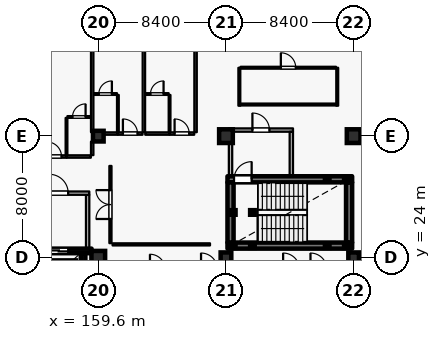
"""IFC4 building model, lengths in metres.
Left out: names, types, materials, properties, quantities, classifications, styles, units other than length and angle.
Written with IfcOpenShell. Run it as: python <this file> out.ifc"""

import sys

from ifc_helpers import new_model, si_unit, direction, frame, frame_2d, origin, origin_2d, place, context, subcontext, project, spatial, rectangle, hollow_rectangle, extrude, element, fill, save


model = new_model("IFC4")
c1 = context("Model", 3, precision=1e-05, world=origin(), true_north=direction((0.0, 1.0)))
c2 = subcontext(c1, "Body", "Model", "MODEL_VIEW")
j1 = project(units=[si_unit("LENGTHUNIT", "METRE"), si_unit("PLANEANGLEUNIT", "RADIAN")], contexts=[c1])
p1 = place(None, origin())
s1 = spatial("IfcSite", under=j1, at=p1, CompositionType="ELEMENT")
p2 = place(p1, origin())
s2 = spatial("IfcBuilding", under=s1, at=p2, CompositionType="ELEMENT")
p3 = place(p2, frame((0.0, 0.0, 21.0)))
s3 = spatial("IfcBuildingStorey", under=s2, at=p3, CompositionType="ELEMENT", Elevation=21.0)
for number, where, z_axis, x_axis in (
    (1, (159.6, 24.0, 0.0), (0.0, 0.0, 1.0), (1.0, 0.0, 0.0)),
    (2, (168.0, 32.0, 0.0), (0.0, 0.0, 1.0), (1.0, 0.0, 0.0)),
    (3, (176.4, 32.0, 0.0), (0.0, 0.0, 1.0), (1.0, 0.0, 0.0)),
):
    element("IfcColumn", number, at=place(p3, frame(where, z_axis=z_axis, x_axis=x_axis)), inside=s3, PredefinedType="COLUMN", context=c2, shape_type="SweptSolid", body=[
        extrude(rectangle(XDim=0.9, YDim=0.9, at=origin_2d()), origin(), (0.0, 0.0, 1.0), 4.2),
    ])
for number, where, z_axis, x_axis in (
    (4, (159.6, 32.0, 0.0), (0.0, 0.0, 1.0), (1.0, 0.0, 0.0)),
    (5, (168.0, 24.0, 0.0), (0.0, 0.0, 1.0), (1.0, 0.0, 0.0)),
    (6, (176.4, 24.0, 0.0), (0.0, 0.0, 1.0), (1.0, 0.0, 0.0)),
):
    element("IfcColumn", number, at=place(p3, frame(where, z_axis=z_axis, x_axis=x_axis)), inside=s3, PredefinedType="COLUMN", context=c2, shape_type="SweptSolid", body=[
        extrude(rectangle(XDim=0.7, YDim=0.7, at=origin_2d()), origin(), (0.0, 0.0, 1.0), 4.2),
    ])
p4 = place(p3, frame((158.6, 21.705, 0.0), z_axis=(0.0, 0.0, 1.0), x_axis=(0.0, 1.0, 0.0)))
e7 = element("IfcWall", 7, at=p4, inside=s3, PredefinedType="SHEAR", context=c2, shape_type="SweptSolid", body=[
    extrude(rectangle(XDim=2.59, YDim=0.3, at=frame_2d((1.295, 0.0))), origin(), (0.0, 0.0, 1.0), 3.965),
])
p5 = place(p3, frame((159.16, 24.45, 0.0), z_axis=(0.0, 0.0, 1.0), x_axis=(-1.0, 0.0, 0.0)))
e8 = element("IfcWall", 8, at=p5, inside=s3, PredefinedType="SHEAR", context=c2, shape_type="SweptSolid", body=[
    extrude(rectangle(XDim=3.91, YDim=0.3, at=frame_2d((1.955, 0.0))), origin(), (0.0, 0.0, 1.0), 3.965),
])
p6 = place(p5, frame((1.535, 0.0, 0.0)))
e9 = element("IfcOpeningElement", 9, at=p6, cuts=e8, PredefinedType="OPENING", context=c2, shape_type="SweptSolid", body=[
    extrude(rectangle(XDim=1.25, YDim=2.25, at=frame_2d((0.625, 1.125))), frame((0.0, 0.16, 0.0), z_axis=(0.0, -1.0, 0.0), x_axis=(1.0, 0.0, 0.0)), (0.0, 0.0, 1.0), 0.32),
])
p7 = place(p3, frame((158.9, 24.605, 0.0), z_axis=(0.0, 0.0, 1.0), x_axis=(0.0, 1.0, 0.0)))
e10 = element("IfcWall", 10, at=p7, inside=s3, PredefinedType="PARTITIONING", context=c2, shape_type="SweptSolid", body=[
    extrude(rectangle(XDim=3.53, YDim=0.22, at=frame_2d((1.765, 0.0))), origin(), (0.0, 0.0, 1.0), 3.965),
])
p8 = place(p3, frame((154.99, 28.25, 0.0), z_axis=(0.0, 0.0, 1.0), x_axis=(1.0, 0.0, 0.0)))
e11 = element("IfcWall", 11, at=p8, inside=s3, PredefinedType="PARTITIONING", context=c2, shape_type="SweptSolid", body=[
    extrude(rectangle(XDim=4.02, YDim=0.22, at=frame_2d((2.01, 0.0))), origin(), (0.0, 0.0, 1.0), 3.965),
])
p9 = place(p8, frame((1.39, 0.0, 0.0)))
e12 = element("IfcOpeningElement", 12, at=p9, cuts=e11, PredefinedType="OPENING", context=c2, shape_type="SweptSolid", body=[
    extrude(rectangle(XDim=1.24, YDim=2.2, at=frame_2d((0.62, 1.1))), frame((0.0, 0.12, 0.0), z_axis=(0.0, -1.0, 0.0), x_axis=(1.0, 0.0, 0.0)), (0.0, 0.0, 1.0), 0.24),
])
p10 = place(p3, frame((168.1, 24.8, 0.0), z_axis=(0.0, 0.0, 1.0), x_axis=(1.0, 0.0, 0.0)))
e13 = element("IfcWall", 13, at=p10, inside=s3, PredefinedType="SHEAR", context=c2, shape_type="SweptSolid", body=[
    extrude(rectangle(XDim=8.2, YDim=0.4, at=frame_2d((4.1, 0.0))), origin(), (0.0, 0.0, 1.0), 3.965),
])
p11 = place(p3, frame((176.1, 25.005, 0.0), z_axis=(0.0, 0.0, 1.0), x_axis=(0.0, 1.0, 0.0)))
e14 = element("IfcWall", 14, at=p11, inside=s3, PredefinedType="SHEAR", context=c2, shape_type="SweptSolid", body=[
    extrude(rectangle(XDim=3.95, YDim=0.4, at=frame_2d((1.975, 0.0))), origin(), (0.0, 0.0, 1.0), 3.965),
])
p12 = place(p3, frame((168.1, 29.16, 0.0), z_axis=(0.0, 0.0, 1.0), x_axis=(1.0, 0.0, 0.0)))
e15 = element("IfcWall", 15, at=p12, inside=s3, PredefinedType="SHEAR", context=c2, shape_type="SweptSolid", body=[
    extrude(rectangle(XDim=8.2, YDim=0.4, at=frame_2d((4.1, 0.0))), origin(), (0.0, 0.0, 1.0), 3.965),
])
p13 = place(p12, frame((0.43, 0.0, 0.0)))
e16 = element("IfcOpeningElement", 16, at=p13, cuts=e15, PredefinedType="OPENING", context=c2, shape_type="SweptSolid", body=[
    extrude(rectangle(XDim=1.16, YDim=2.2, at=frame_2d((0.58, 1.1))), frame((0.0, 0.21, 0.0), z_axis=(0.0, -1.0, 0.0), x_axis=(1.0, 0.0, 0.0)), (0.0, 0.0, 1.0), 0.42),
])
p14 = place(p3, frame((168.3, 25.005, 0.0), z_axis=(0.0, 0.0, 1.0), x_axis=(0.0, 1.0, 0.0)))
e17 = element("IfcWall", 17, at=p14, inside=s3, PredefinedType="SHEAR", context=c2, shape_type="SweptSolid", body=[
    extrude(rectangle(XDim=3.95, YDim=0.4, at=frame_2d((1.975, 0.0))), origin(), (0.0, 0.0, 1.0), 3.965),
])
p15 = place(p3, frame((168.3, 29.365, 0.0), z_axis=(0.0, 0.0, 1.0), x_axis=(0.0, 1.0, 0.0)))
e18 = element("IfcWall", 18, at=p15, inside=s3, PredefinedType="PARTITIONING", context=c2, shape_type="SweptSolid", body=[
    extrude(rectangle(XDim=2.92, YDim=0.22, at=frame_2d((1.46, 0.0))), origin(), (0.0, 0.0, 1.0), 3.965),
])
p16 = place(p3, frame((168.19, 32.4, 0.0), z_axis=(0.0, 0.0, 1.0), x_axis=(1.0, 0.0, 0.0)))
e19 = element("IfcWall", 19, at=p16, inside=s3, PredefinedType="PARTITIONING", context=c2, shape_type="SweptSolid", body=[
    extrude(rectangle(XDim=4.22, YDim=0.22, at=frame_2d((2.11, 0.0))), origin(), (0.0, 0.0, 1.0), 3.965),
])
p17 = place(p16, frame((1.55, 0.0, 0.0)))
e20 = element("IfcOpeningElement", 20, at=p17, cuts=e19, PredefinedType="OPENING", context=c2, shape_type="SweptSolid", body=[
    extrude(rectangle(XDim=1.12, YDim=2.2, at=frame_2d((0.56, 1.1))), frame((0.0, 0.12, 0.0), z_axis=(0.0, -1.0, 0.0), x_axis=(1.0, 0.0, 0.0)), (0.0, 0.0, 1.0), 0.24),
])
p18 = place(p3, frame((172.3, 29.365, 0.0), z_axis=(0.0, 0.0, 1.0), x_axis=(0.0, 1.0, 0.0)))
e21 = element("IfcWall", 21, at=p18, inside=s3, PredefinedType="PARTITIONING", context=c2, shape_type="SweptSolid", body=[
    extrude(rectangle(XDim=2.92, YDim=0.22, at=frame_2d((1.46, 0.0))), origin(), (0.0, 0.0, 1.0), 3.965),
])
for number, where, z_axis, x_axis in (
    (22, (168.48, 24.8, 0.0), (0.0, 0.0, 1.0), (1.0, 0.0, 0.0)),
    (23, (168.48, 26.98, 0.0), (0.0, 0.0, 1.0), (1.0, 0.0, 0.0)),
    (24, (169.74, 24.8, 0.0), (0.0, 0.0, 1.0), (1.0, 0.0, 0.0)),
    (25, (169.74, 26.98, 0.0), (0.0, 0.0, 1.0), (1.0, 0.0, 0.0)),
):
    element("IfcColumn", number, at=place(p3, frame(where, z_axis=z_axis, x_axis=x_axis)), inside=s3, PredefinedType="COLUMN", context=c2, shape_type="SweptSolid", body=[
        extrude(hollow_rectangle(XDim=0.3, YDim=0.3, WallThickness=0.012, at=origin_2d()), origin(), (0.0, 0.0, 1.0), 4.02),
    ])
for number, where, z_axis, x_axis in (
    (26, (174.66, 24.8, -2.4), (0.0, 0.0, 1.0), (1.0, 0.0, 0.0)),
    (27, (174.66, 29.16, -2.4), (0.0, 0.0, 1.0), (1.0, 0.0, 0.0)),
    (28, (175.92, 24.8, -2.4), (0.0, 0.0, 1.0), (1.0, 0.0, 0.0)),
    (29, (175.92, 29.16, -2.4), (0.0, 0.0, 1.0), (1.0, 0.0, 0.0)),
):
    element("IfcColumn", number, at=place(p3, frame(where, z_axis=z_axis, x_axis=x_axis)), inside=s3, PredefinedType="COLUMN", context=c2, shape_type="SweptSolid", body=[
        extrude(hollow_rectangle(XDim=0.3, YDim=0.3, WallThickness=0.012, at=origin_2d()), origin(), (0.0, 0.0, 1.0), 4.32),
    ])
p19 = place(p3, frame((155.89, 30.66, 0.0), z_axis=(0.0, 0.0, 1.0), x_axis=(1.0, 0.0, 0.0)))
e30 = element("IfcWall", 30, at=p19, inside=s3, PredefinedType="PARTITIONING", context=c2, shape_type="SweptSolid", body=[
    extrude(rectangle(XDim=1.62, YDim=0.16, at=frame_2d((0.81, 0.0))), origin(), (0.0, 0.0, 1.0), 3.965),
])
p20 = place(p19, frame((0.33, 0.0, 0.0)))
e31 = element("IfcOpeningElement", 31, at=p20, cuts=e30, PredefinedType="OPENING", context=c2, shape_type="SweptSolid", body=[
    extrude(rectangle(XDim=0.96, YDim=2.2, at=frame_2d((0.48, 1.1))), frame((0.0, 0.09, 0.0), z_axis=(0.0, -1.0, 0.0), x_axis=(1.0, 0.0, 0.0)), (0.0, 0.0, 1.0), 0.18),
])
p21 = place(p3, frame((157.52, 30.66, 0.0), z_axis=(0.0, 0.0, 1.0), x_axis=(1.0, 0.0, 0.0)))
e32 = element("IfcWall", 32, at=p21, inside=s3, PredefinedType="PARTITIONING", context=c2, shape_type="SweptSolid", body=[
    extrude(rectangle(XDim=1.59, YDim=0.16, at=frame_2d((0.795, 0.0))), origin(), (0.0, 0.0, 1.0), 3.965),
])
p22 = place(p3, frame((157.51, 30.75, 0.0), z_axis=(0.0, 0.0, 1.0), x_axis=(0.0, 1.0, 0.0)))
e33 = element("IfcWall", 33, at=p22, inside=s3, PredefinedType="PARTITIONING", context=c2, shape_type="SweptSolid", body=[
    extrude(rectangle(XDim=2.45, YDim=0.115, at=frame_2d((1.225, 0.0))), origin(), (0.0, 0.0, 1.0), 3.965),
])
p23 = place(p3, frame((157.57, 33.26, 0.0), z_axis=(0.0, 0.0, 1.0), x_axis=(1.0, 0.0, 0.0)))
e34 = element("IfcWall", 34, at=p23, inside=s3, PredefinedType="PARTITIONING", context=c2, shape_type="SweptSolid", body=[
    extrude(rectangle(XDim=1.53, YDim=0.115, at=frame_2d((0.765, 0.0))), origin(), (0.0, 0.0, 1.0), 3.965),
])
p24 = place(p23, frame((0.335, 0.0, 0.0)))
e35 = element("IfcOpeningElement", 35, at=p24, cuts=e34, PredefinedType="OPENING", context=c2, shape_type="SweptSolid", body=[
    extrude(rectangle(XDim=0.86, YDim=2.12, at=frame_2d((0.43, 1.06))), frame((0.0, 0.067, 0.0), z_axis=(0.0, -1.0, 0.0), x_axis=(1.0, 0.0, 0.0)), (0.0, 0.0, 1.0), 0.135),
])
p25 = place(p3, frame((159.2, 30.75, 0.0), z_axis=(0.0, 0.0, 1.0), x_axis=(0.0, 1.0, 0.0)))
e36 = element("IfcWall", 36, at=p25, inside=s3, PredefinedType="PARTITIONING", context=c2, shape_type="SweptSolid", body=[
    extrude(rectangle(XDim=0.89, YDim=0.16, at=frame_2d((0.445, 0.0))), origin(), (0.0, 0.0, 1.0), 3.965),
])
p26 = place(p3, frame((159.29, 32.17, 0.0), z_axis=(0.0, 0.0, 1.0), x_axis=(1.0, 0.0, 0.0)))
e37 = element("IfcWall", 37, at=p26, inside=s3, PredefinedType="PARTITIONING", context=c2, shape_type="SweptSolid", body=[
    extrude(rectangle(XDim=1.59, YDim=0.16, at=frame_2d((0.795, 0.0))), origin(), (0.0, 0.0, 1.0), 3.965),
])
p27 = place(p3, frame((160.89, 32.17, 0.0), z_axis=(0.0, 0.0, 1.0), x_axis=(1.0, 0.0, 0.0)))
e38 = element("IfcWall", 38, at=p27, inside=s3, PredefinedType="PARTITIONING", context=c2, shape_type="SweptSolid", body=[
    extrude(rectangle(XDim=1.62, YDim=0.16, at=frame_2d((0.81, 0.0))), origin(), (0.0, 0.0, 1.0), 3.965),
])
p28 = place(p27, frame((0.33, 0.0, 0.0)))
e39 = element("IfcOpeningElement", 39, at=p28, cuts=e38, PredefinedType="OPENING", context=c2, shape_type="SweptSolid", body=[
    extrude(rectangle(XDim=0.96, YDim=2.2, at=frame_2d((0.48, 1.1))), frame((0.0, 0.09, 0.0), z_axis=(0.0, -1.0, 0.0), x_axis=(1.0, 0.0, 0.0)), (0.0, 0.0, 1.0), 0.18),
])
p29 = place(p3, frame((160.89, 32.26, 0.0), z_axis=(0.0, 0.0, 1.0), x_axis=(0.0, 1.0, 0.0)))
e40 = element("IfcWall", 40, at=p29, inside=s3, PredefinedType="PARTITIONING", context=c2, shape_type="SweptSolid", body=[
    extrude(rectangle(XDim=2.45, YDim=0.115, at=frame_2d((1.225, 0.0))), origin(), (0.0, 0.0, 1.0), 3.965),
])
p30 = place(p3, frame((159.3, 34.77, 0.0), z_axis=(0.0, 0.0, 1.0), x_axis=(1.0, 0.0, 0.0)))
e41 = element("IfcWall", 41, at=p30, inside=s3, PredefinedType="PARTITIONING", context=c2, shape_type="SweptSolid", body=[
    extrude(rectangle(XDim=1.53, YDim=0.115, at=frame_2d((0.765, 0.0))), origin(), (0.0, 0.0, 1.0), 3.965),
])
p31 = place(p30, frame((0.335, 0.0, 0.0)))
e42 = element("IfcOpeningElement", 42, at=p31, cuts=e41, PredefinedType="OPENING", context=c2, shape_type="SweptSolid", body=[
    extrude(rectangle(XDim=0.86, YDim=2.12, at=frame_2d((0.43, 1.06))), frame((0.0, 0.067, 0.0), z_axis=(0.0, -1.0, 0.0), x_axis=(1.0, 0.0, 0.0)), (0.0, 0.0, 1.0), 0.135),
])
p32 = place(p3, frame((159.2, 32.26, 0.0), z_axis=(0.0, 0.0, 1.0), x_axis=(0.0, 1.0, 0.0)))
e43 = element("IfcWall", 43, at=p32, inside=s3, PredefinedType="PARTITIONING", context=c2, shape_type="SweptSolid", body=[
    extrude(rectangle(XDim=7.4, YDim=0.16, at=frame_2d((3.7, 0.0))), origin(), (0.0, 0.0, 1.0), 3.965),
])
p33 = place(p3, frame((162.69, 32.17, 0.0), z_axis=(0.0, 0.0, 1.0), x_axis=(1.0, 0.0, 0.0)))
e44 = element("IfcWall", 44, at=p33, inside=s3, PredefinedType="PARTITIONING", context=c2, shape_type="SweptSolid", body=[
    extrude(rectangle(XDim=1.59, YDim=0.16, at=frame_2d((0.795, 0.0))), origin(), (0.0, 0.0, 1.0), 3.965),
])
p34 = place(p3, frame((164.29, 32.17, 0.0), z_axis=(0.0, 0.0, 1.0), x_axis=(1.0, 0.0, 0.0)))
e45 = element("IfcWall", 45, at=p34, inside=s3, PredefinedType="PARTITIONING", context=c2, shape_type="SweptSolid", body=[
    extrude(rectangle(XDim=1.62, YDim=0.16, at=frame_2d((0.81, 0.0))), origin(), (0.0, 0.0, 1.0), 3.965),
])
p35 = place(p34, frame((0.33, 0.0, 0.0)))
e46 = element("IfcOpeningElement", 46, at=p35, cuts=e45, PredefinedType="OPENING", context=c2, shape_type="SweptSolid", body=[
    extrude(rectangle(XDim=0.96, YDim=2.2, at=frame_2d((0.48, 1.1))), frame((0.0, 0.09, 0.0), z_axis=(0.0, -1.0, 0.0), x_axis=(1.0, 0.0, 0.0)), (0.0, 0.0, 1.0), 0.18),
])
p36 = place(p3, frame((164.29, 32.26, 0.0), z_axis=(0.0, 0.0, 1.0), x_axis=(0.0, 1.0, 0.0)))
e47 = element("IfcWall", 47, at=p36, inside=s3, PredefinedType="PARTITIONING", context=c2, shape_type="SweptSolid", body=[
    extrude(rectangle(XDim=2.45, YDim=0.115, at=frame_2d((1.225, 0.0))), origin(), (0.0, 0.0, 1.0), 3.965),
])
p37 = place(p3, frame((162.7, 34.77, 0.0), z_axis=(0.0, 0.0, 1.0), x_axis=(1.0, 0.0, 0.0)))
e48 = element("IfcWall", 48, at=p37, inside=s3, PredefinedType="PARTITIONING", context=c2, shape_type="SweptSolid", body=[
    extrude(rectangle(XDim=1.53, YDim=0.115, at=frame_2d((0.765, 0.0))), origin(), (0.0, 0.0, 1.0), 3.965),
])
p38 = place(p37, frame((0.335, 0.0, 0.0)))
e49 = element("IfcOpeningElement", 49, at=p38, cuts=e48, PredefinedType="OPENING", context=c2, shape_type="SweptSolid", body=[
    extrude(rectangle(XDim=0.86, YDim=2.12, at=frame_2d((0.43, 1.06))), frame((0.0, 0.067, 0.0), z_axis=(0.0, -1.0, 0.0), x_axis=(1.0, 0.0, 0.0)), (0.0, 0.0, 1.0), 0.135),
])
p39 = place(p3, frame((162.6, 32.26, 0.0), z_axis=(0.0, 0.0, 1.0), x_axis=(0.0, 1.0, 0.0)))
e50 = element("IfcWall", 50, at=p39, inside=s3, PredefinedType="PARTITIONING", context=c2, shape_type="SweptSolid", body=[
    extrude(rectangle(XDim=10.26, YDim=0.16, at=frame_2d((5.13, 0.0))), origin(), (0.0, 0.0, 1.0), 3.965),
])
p40 = place(p3, frame((166.0, 32.26, 0.0), z_axis=(0.0, 0.0, 1.0), x_axis=(0.0, 1.0, 0.0)))
e51 = element("IfcWall", 51, at=p40, inside=s3, PredefinedType="PARTITIONING", context=c2, shape_type="SweptSolid", body=[
    extrude(rectangle(XDim=8.64, YDim=0.16, at=frame_2d((4.32, 0.0))), origin(), (0.0, 0.0, 1.0), 3.965),
])
p41 = place(p3, frame((160.4, 24.96, 0.0), z_axis=(0.0, 0.0, 1.0), x_axis=(0.0, 1.0, 0.0)))
e52 = element("IfcWall", 52, at=p41, inside=s3, PredefinedType="PARTITIONING", context=c2, shape_type="SweptSolid", body=[
    extrude(rectangle(XDim=5.08, YDim=0.14, at=frame_2d((2.54, 0.0))), origin(), (0.0, 0.0, 1.0), 3.965),
])
p42 = place(p41, frame((1.59, 0.0, 0.0)))
e53 = element("IfcOpeningElement", 53, at=p42, cuts=e52, PredefinedType="OPENING", context=c2, shape_type="SweptSolid", body=[
    extrude(rectangle(XDim=1.9, YDim=2.4, at=frame_2d((0.95, 1.2))), frame((0.0, 0.08, 0.0), z_axis=(0.0, -1.0, 0.0), x_axis=(1.0, 0.0, 0.0)), (0.0, 0.0, 1.0), 0.16),
])
p43 = place(p3, frame((160.54, 24.88, 0.0), z_axis=(0.0, 0.0, 1.0), x_axis=(1.0, 0.0, 0.0)))
e54 = element("IfcWall", 54, at=p43, inside=s3, PredefinedType="PARTITIONING", context=c2, shape_type="SweptSolid", body=[
    extrude(rectangle(XDim=6.41, YDim=0.14, at=frame_2d((3.205, 0.0))), origin(), (0.0, 0.0, 1.0), 3.965),
])
p44 = place(p3, frame((168.96, 36.5, 0.0), z_axis=(0.0, 0.0, 1.0), x_axis=(1.0, 0.0, 0.0)))
e55 = element("IfcWall", 55, at=p44, inside=s3, PredefinedType="PARTITIONING", context=c2, shape_type="SweptSolid", body=[
    extrude(rectangle(XDim=6.28, YDim=0.125, at=frame_2d((3.14, 0.0))), origin(), (0.0, 0.0, 1.0), 3.965),
])
p45 = place(p44, frame((2.65, 0.0, 0.0)))
e56 = element("IfcOpeningElement", 56, at=p45, cuts=e55, PredefinedType="OPENING", context=c2, shape_type="SweptSolid", body=[
    extrude(rectangle(XDim=0.98, YDim=2.15, at=frame_2d((0.49, 1.075))), frame((0.0, 0.073, 0.0), z_axis=(0.0, -1.0, 0.0), x_axis=(1.0, 0.0, 0.0)), (0.0, 0.0, 1.0), 0.145),
])
for number, where, z_axis, x_axis in (
    (57, (168.88, 34.0, 0.0), (0.0, 0.0, 1.0), (0.0, 1.0, 0.0)),
    (58, (175.32, 34.0, 0.0), (0.0, 0.0, 1.0), (0.0, 1.0, 0.0)),
):
    element("IfcWall", number, at=place(p3, frame(where, z_axis=z_axis, x_axis=x_axis)), inside=s3, PredefinedType="PARTITIONING", context=c2, shape_type="SweptSolid", body=[
        extrude(rectangle(XDim=2.496, YDim=0.125, at=frame_2d((1.248, 0.0))), origin(), (0.0, 0.0, 1.0), 3.965),
    ])
p46 = place(p3, frame((168.943, 34.08, 0.0), z_axis=(0.0, 0.0, 1.0), x_axis=(1.0, 0.0, 0.0)))
e59 = element("IfcWall", 59, at=p46, inside=s3, PredefinedType="PARTITIONING", context=c2, shape_type="SweptSolid", body=[
    extrude(rectangle(XDim=6.314, YDim=0.125, at=frame_2d((3.157, 0.0))), origin(), (0.0, 0.0, 1.0), 3.965),
])
p47 = place(p6, origin())
e60 = element("IfcDoor", 60, at=p47, inside=s3, OperationType="DOUBLE_DOOR_SLIDING", PredefinedType="DOOR", context=c2, shape_type="SweptSolid", body=[
    extrude(rectangle(XDim=1.25, YDim=2.25, at=frame_2d((0.625, 1.125))), frame((0.0, 0.025, 0.0), z_axis=(0.0, -1.0, 0.0), x_axis=(1.0, 0.0, 0.0)), (0.0, 0.0, 1.0), 0.05),
])
fill(e9, e60)
p48 = place(p9, origin())
e61 = element("IfcDoor", 61, at=p48, inside=s3, OperationType="SINGLE_SWING_LEFT", PredefinedType="DOOR", context=c2, shape_type="SweptSolid", body=[
    extrude(rectangle(XDim=1.24, YDim=2.2, at=frame_2d((0.62, 1.1))), frame((0.0, 0.025, 0.0), z_axis=(0.0, -1.0, 0.0), x_axis=(1.0, 0.0, 0.0)), (0.0, 0.0, 1.0), 0.05),
])
fill(e12, e61)
p49 = place(p13, origin())
e62 = element("IfcDoor", 62, at=p49, inside=s3, OperationType="SINGLE_SWING_RIGHT", PredefinedType="DOOR", context=c2, shape_type="SweptSolid", body=[
    extrude(rectangle(XDim=1.16, YDim=2.2, at=frame_2d((0.58, 1.1))), frame((0.0, 0.025, 0.0), z_axis=(0.0, -1.0, 0.0), x_axis=(1.0, 0.0, 0.0)), (0.0, 0.0, 1.0), 0.05),
])
fill(e16, e62)
p50 = place(p17, origin())
e63 = element("IfcDoor", 63, at=p50, inside=s3, OperationType="SINGLE_SWING_LEFT", PredefinedType="DOOR", context=c2, shape_type="SweptSolid", body=[
    extrude(rectangle(XDim=1.12, YDim=2.2, at=frame_2d((0.56, 1.1))), frame((0.0, 0.025, 0.0), z_axis=(0.0, -1.0, 0.0), x_axis=(1.0, 0.0, 0.0)), (0.0, 0.0, 1.0), 0.05),
])
fill(e20, e63)
p51 = place(p20, origin())
e64 = element("IfcDoor", 64, at=p51, inside=s3, OperationType="SINGLE_SWING_LEFT", PredefinedType="DOOR", context=c2, shape_type="SweptSolid", body=[
    extrude(rectangle(XDim=0.96, YDim=2.2, at=frame_2d((0.48, 1.1))), frame((0.0, 0.025, 0.0), z_axis=(0.0, -1.0, 0.0), x_axis=(1.0, 0.0, 0.0)), (0.0, 0.0, 1.0), 0.05),
])
fill(e31, e64)
p52 = place(p24, origin())
e65 = element("IfcDoor", 65, at=p52, inside=s3, OperationType="SINGLE_SWING_RIGHT", PredefinedType="DOOR", context=c2, shape_type="SweptSolid", body=[
    extrude(rectangle(XDim=0.86, YDim=2.12, at=frame_2d((0.43, 1.06))), frame((0.0, 0.025, 0.0), z_axis=(0.0, -1.0, 0.0), x_axis=(1.0, 0.0, 0.0)), (0.0, 0.0, 1.0), 0.05),
])
fill(e35, e65)
p53 = place(p28, origin())
e66 = element("IfcDoor", 66, at=p53, inside=s3, OperationType="SINGLE_SWING_LEFT", PredefinedType="DOOR", context=c2, shape_type="SweptSolid", body=[
    extrude(rectangle(XDim=0.96, YDim=2.2, at=frame_2d((0.48, 1.1))), frame((0.0, 0.025, 0.0), z_axis=(0.0, -1.0, 0.0), x_axis=(1.0, 0.0, 0.0)), (0.0, 0.0, 1.0), 0.05),
])
fill(e39, e66)
p54 = place(p31, origin())
e67 = element("IfcDoor", 67, at=p54, inside=s3, OperationType="SINGLE_SWING_RIGHT", PredefinedType="DOOR", context=c2, shape_type="SweptSolid", body=[
    extrude(rectangle(XDim=0.86, YDim=2.12, at=frame_2d((0.43, 1.06))), frame((0.0, 0.025, 0.0), z_axis=(0.0, -1.0, 0.0), x_axis=(1.0, 0.0, 0.0)), (0.0, 0.0, 1.0), 0.05),
])
fill(e42, e67)
p55 = place(p35, origin())
e68 = element("IfcDoor", 68, at=p55, inside=s3, OperationType="SINGLE_SWING_LEFT", PredefinedType="DOOR", context=c2, shape_type="SweptSolid", body=[
    extrude(rectangle(XDim=0.96, YDim=2.2, at=frame_2d((0.48, 1.1))), frame((0.0, 0.025, 0.0), z_axis=(0.0, -1.0, 0.0), x_axis=(1.0, 0.0, 0.0)), (0.0, 0.0, 1.0), 0.05),
])
fill(e46, e68)
p56 = place(p38, origin())
e69 = element("IfcDoor", 69, at=p56, inside=s3, OperationType="SINGLE_SWING_RIGHT", PredefinedType="DOOR", context=c2, shape_type="SweptSolid", body=[
    extrude(rectangle(XDim=0.86, YDim=2.12, at=frame_2d((0.43, 1.06))), frame((0.0, 0.025, 0.0), z_axis=(0.0, -1.0, 0.0), x_axis=(1.0, 0.0, 0.0)), (0.0, 0.0, 1.0), 0.05),
])
fill(e49, e69)
p57 = place(p42, origin())
e70 = element("IfcDoor", 70, at=p57, inside=s3, OperationType="DOUBLE_DOOR_SINGLE_SWING", PredefinedType="DOOR", context=c2, shape_type="SweptSolid", body=[
    extrude(rectangle(XDim=1.9, YDim=2.4, at=frame_2d((0.95, 1.2))), frame((0.0, 0.025, 0.0), z_axis=(0.0, -1.0, 0.0), x_axis=(1.0, 0.0, 0.0)), (0.0, 0.0, 1.0), 0.05),
])
fill(e53, e70)
p58 = place(p45, origin())
e71 = element("IfcDoor", 71, at=p58, inside=s3, OperationType="SINGLE_SWING_LEFT", PredefinedType="DOOR", context=c2, shape_type="SweptSolid", body=[
    extrude(rectangle(XDim=0.98, YDim=2.15, at=frame_2d((0.49, 1.075))), frame((0.0, 0.025, 0.0), z_axis=(0.0, -1.0, 0.0), x_axis=(1.0, 0.0, 0.0)), (0.0, 0.0, 1.0), 0.05),
])
fill(e56, e71)
save(model, sys.argv[1])
